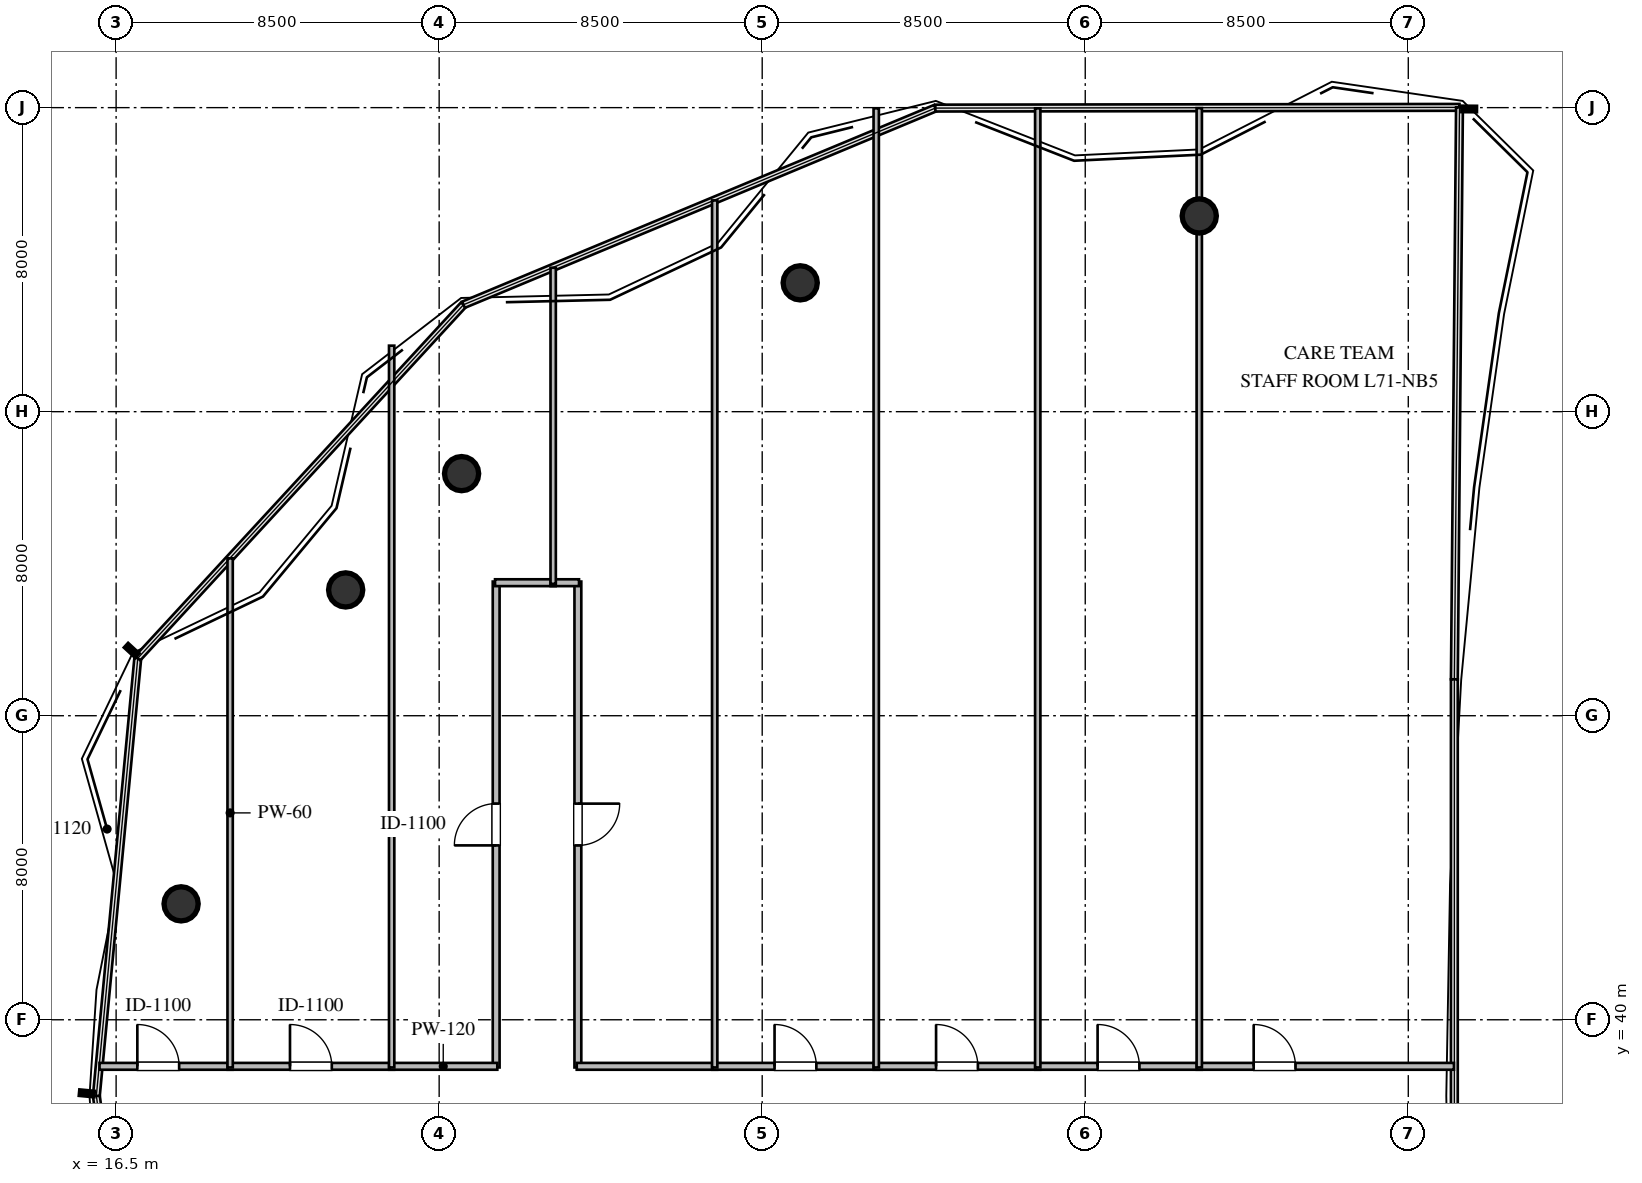
"""IFC4 building model, lengths in metres.
Left out: names, types, materials, properties, quantities, classifications, styles, units other than length and angle.
Written with IfcOpenShell. Run it as: python <this file> out.ifc"""

import sys

from ifc_helpers import new_model, si_unit, direction, frame, frame_2d, origin, origin_2d, place, context, subcontext, project, spatial, rectangle, circle, extrude, element, fill, save


model = new_model("IFC4")
c1 = context("Model", 3, precision=1e-05, world=origin(), true_north=direction((0.0, 1.0)))
c2 = subcontext(c1, "Body", "Model", "MODEL_VIEW")
j1 = project(units=[si_unit("LENGTHUNIT", "METRE"), si_unit("PLANEANGLEUNIT", "RADIAN")], contexts=[c1])
p1 = place(None, origin())
s1 = spatial("IfcSite", under=j1, at=p1, CompositionType="ELEMENT")
p2 = place(p1, origin())
s2 = spatial("IfcBuilding", under=s1, at=p2, CompositionType="ELEMENT")
p3 = place(p2, frame((0.0, 0.0, 270.0)))
s3 = spatial("IfcBuildingStorey", under=s2, at=p3, CompositionType="ELEMENT", Elevation=270.0)
for number, where, z_axis, x_axis in (
    (1, (45.0, 61.15, 0.0), (0.0, 0.0, 1.0), (1.0, 0.0, 0.0)),
    (2, (34.5, 59.39, 0.0), (0.0, 0.0, 1.0), (1.0, 0.0, 0.0)),
    (3, (25.59, 54.37, 0.0), (0.0, 0.0, 1.0), (1.0, 0.0, 0.0)),
    (4, (22.54, 51.31, 0.0), (0.0, 0.0, 1.0), (1.0, 0.0, 0.0)),
    (5, (18.21, 43.05, 0.0), (0.0, 0.0, 1.0), (1.0, 0.0, 0.0)),
):
    element("IfcColumn", number, at=place(p3, frame(where, z_axis=z_axis, x_axis=x_axis)), inside=s3, PredefinedType="COLUMN", context=c2, shape_type="SweptSolid", body=[
        extrude(circle(Radius=0.45, at=origin_2d()), origin(), (0.0, 0.0, 1.0), 3.8),
    ])
p4 = place(p3, frame((16.063, 38.775, 0.0), z_axis=(0.0, 0.0, 1.0), x_axis=(1.0, 0.0, 0.0)))
e6 = element("IfcWall", 6, at=p4, inside=s3, PredefinedType="PARTITIONING", context=c2, shape_type="SweptSolid", body=[
    extrude(rectangle(XDim=3.501, YDim=0.18, at=frame_2d((1.751, 0.0))), origin(), (0.0, 0.0, 1.0), 3.56),
])
p5 = place(p4, frame((0.995, 0.0, 0.0)))
e7 = element("IfcOpeningElement", 7, at=p5, cuts=e6, PredefinedType="OPENING", context=c2, shape_type="SweptSolid", body=[
    extrude(rectangle(XDim=1.1, YDim=2.1, at=frame_2d((0.55, 1.05))), frame((0.0, 0.1, 0.0), z_axis=(0.0, -1.0, 0.0), x_axis=(1.0, 0.0, 0.0)), (0.0, 0.0, 1.0), 0.2),
])
p6 = place(p3, frame((19.435, 38.775, 0.0), z_axis=(0.0, 0.0, 1.0), x_axis=(1.0, 0.0, 0.0)))
e8 = element("IfcWall", 8, at=p6, inside=s3, PredefinedType="PARTITIONING", context=c2, shape_type="SweptSolid", body=[
    extrude(rectangle(XDim=4.38, YDim=0.18, at=frame_2d((2.19, 0.0))), origin(), (0.0, 0.0, 1.0), 3.56),
])
p7 = place(p6, frame((1.64, 0.0, 0.0)))
e9 = element("IfcOpeningElement", 9, at=p7, cuts=e8, PredefinedType="OPENING", context=c2, shape_type="SweptSolid", body=[
    extrude(rectangle(XDim=1.1, YDim=2.1, at=frame_2d((0.55, 1.05))), frame((0.0, 0.1, 0.0), z_axis=(0.0, -1.0, 0.0), x_axis=(1.0, 0.0, 0.0)), (0.0, 0.0, 1.0), 0.2),
])
p8 = place(p3, frame((26.5, 38.745, 0.0), z_axis=(0.0, 0.0, 1.0), x_axis=(0.0, 1.0, 0.0)))
e10 = element("IfcWall", 10, at=p8, inside=s3, PredefinedType="PARTITIONING", context=c2, shape_type="SweptSolid", body=[
    extrude(rectangle(XDim=12.785, YDim=0.18, at=frame_2d((6.393, 0.0))), origin(), (0.0, 0.0, 1.0), 3.56),
])
p9 = place(p8, frame((5.843, 0.0, 0.0)))
e11 = element("IfcOpeningElement", 11, at=p9, cuts=e10, PredefinedType="OPENING", context=c2, shape_type="SweptSolid", body=[
    extrude(rectangle(XDim=1.1, YDim=2.1, at=frame_2d((0.55, 1.05))), frame((0.0, 0.1, 0.0), z_axis=(0.0, -1.0, 0.0), x_axis=(1.0, 0.0, 0.0)), (0.0, 0.0, 1.0), 0.2),
])
p10 = place(p3, frame((23.685, 38.775, 0.0), z_axis=(0.0, 0.0, 1.0), x_axis=(1.0, 0.0, 0.0)))
e12 = element("IfcWall", 12, at=p10, inside=s3, PredefinedType="PARTITIONING", context=c2, shape_type="SweptSolid", body=[
    extrude(rectangle(XDim=2.845, YDim=0.18, at=frame_2d((1.422, 0.0))), origin(), (0.0, 0.0, 1.0), 3.56),
])
p11 = place(p3, frame((26.47, 51.5, 0.0), z_axis=(0.0, 0.0, 1.0), x_axis=(1.0, 0.0, 0.0)))
e13 = element("IfcWall", 13, at=p11, inside=s3, PredefinedType="PARTITIONING", context=c2, shape_type="SweptSolid", body=[
    extrude(rectangle(XDim=1.595, YDim=0.18, at=frame_2d((0.797, 0.0))), origin(), (0.0, 0.0, 1.0), 3.56),
])
p12 = place(p3, frame((28.65, 51.53, 0.0), z_axis=(0.0, 0.0, 1.0), x_axis=(0.0, -1.0, 0.0)))
e14 = element("IfcWall", 14, at=p12, inside=s3, PredefinedType="PARTITIONING", context=c2, shape_type="SweptSolid", body=[
    extrude(rectangle(XDim=12.785, YDim=0.18, at=frame_2d((6.393, 0.0))), origin(), (0.0, 0.0, 1.0), 3.56),
])
p13 = place(p12, frame((5.843, 0.0, 0.0)))
e15 = element("IfcOpeningElement", 15, at=p13, cuts=e14, PredefinedType="OPENING", context=c2, shape_type="SweptSolid", body=[
    extrude(rectangle(XDim=1.1, YDim=2.1, at=frame_2d((0.55, 1.05))), frame((0.0, 0.1, 0.0), z_axis=(0.0, -1.0, 0.0), x_axis=(1.0, 0.0, 0.0)), (0.0, 0.0, 1.0), 0.2),
])
p14 = place(p3, frame((28.62, 38.775, 0.0), z_axis=(0.0, 0.0, 1.0), x_axis=(1.0, 0.0, 0.0)))
e16 = element("IfcWall", 16, at=p14, inside=s3, PredefinedType="PARTITIONING", context=c2, shape_type="SweptSolid", body=[
    extrude(rectangle(XDim=3.695, YDim=0.18, at=frame_2d((1.847, 0.0))), origin(), (0.0, 0.0, 1.0), 3.56),
])
p15 = place(p3, frame((27.935, 51.5, 0.0), z_axis=(0.0, 0.0, 1.0), x_axis=(1.0, 0.0, 0.0)))
e17 = element("IfcWall", 17, at=p15, inside=s3, PredefinedType="PARTITIONING", context=c2, shape_type="SweptSolid", body=[
    extrude(rectangle(XDim=0.745, YDim=0.18, at=frame_2d((0.373, 0.0))), origin(), (0.0, 0.0, 1.0), 3.56),
])
p16 = place(p3, frame((32.185, 38.775, 0.0), z_axis=(0.0, 0.0, 1.0), x_axis=(1.0, 0.0, 0.0)))
e18 = element("IfcWall", 18, at=p16, inside=s3, PredefinedType="PARTITIONING", context=c2, shape_type="SweptSolid", body=[
    extrude(rectangle(XDim=4.38, YDim=0.18, at=frame_2d((2.19, 0.0))), origin(), (0.0, 0.0, 1.0), 3.56),
])
p17 = place(p16, frame((1.64, 0.0, 0.0)))
e19 = element("IfcOpeningElement", 19, at=p17, cuts=e18, PredefinedType="OPENING", context=c2, shape_type="SweptSolid", body=[
    extrude(rectangle(XDim=1.1, YDim=2.1, at=frame_2d((0.55, 1.05))), frame((0.0, 0.1, 0.0), z_axis=(0.0, -1.0, 0.0), x_axis=(1.0, 0.0, 0.0)), (0.0, 0.0, 1.0), 0.2),
])
p18 = place(p3, frame((36.435, 38.775, 0.0), z_axis=(0.0, 0.0, 1.0), x_axis=(1.0, 0.0, 0.0)))
e20 = element("IfcWall", 20, at=p18, inside=s3, PredefinedType="PARTITIONING", context=c2, shape_type="SweptSolid", body=[
    extrude(rectangle(XDim=4.38, YDim=0.18, at=frame_2d((2.19, 0.0))), origin(), (0.0, 0.0, 1.0), 3.56),
])
p19 = place(p18, frame((1.64, 0.0, 0.0)))
e21 = element("IfcOpeningElement", 21, at=p19, cuts=e20, PredefinedType="OPENING", context=c2, shape_type="SweptSolid", body=[
    extrude(rectangle(XDim=1.1, YDim=2.1, at=frame_2d((0.55, 1.05))), frame((0.0, 0.1, 0.0), z_axis=(0.0, -1.0, 0.0), x_axis=(1.0, 0.0, 0.0)), (0.0, 0.0, 1.0), 0.2),
])
p20 = place(p3, frame((40.685, 38.775, 0.0), z_axis=(0.0, 0.0, 1.0), x_axis=(1.0, 0.0, 0.0)))
e22 = element("IfcWall", 22, at=p20, inside=s3, PredefinedType="PARTITIONING", context=c2, shape_type="SweptSolid", body=[
    extrude(rectangle(XDim=4.38, YDim=0.18, at=frame_2d((2.19, 0.0))), origin(), (0.0, 0.0, 1.0), 3.56),
])
p21 = place(p20, frame((1.64, 0.0, 0.0)))
e23 = element("IfcOpeningElement", 23, at=p21, cuts=e22, PredefinedType="OPENING", context=c2, shape_type="SweptSolid", body=[
    extrude(rectangle(XDim=1.1, YDim=2.1, at=frame_2d((0.55, 1.05))), frame((0.0, 0.1, 0.0), z_axis=(0.0, -1.0, 0.0), x_axis=(1.0, 0.0, 0.0)), (0.0, 0.0, 1.0), 0.2),
])
p22 = place(p3, frame((44.935, 38.775, 0.0), z_axis=(0.0, 0.0, 1.0), x_axis=(1.0, 0.0, 0.0)))
e24 = element("IfcWall", 24, at=p22, inside=s3, PredefinedType="PARTITIONING", context=c2, shape_type="SweptSolid", body=[
    extrude(rectangle(XDim=6.767, YDim=0.18, at=frame_2d((3.383, 0.0))), origin(), (0.0, 0.0, 1.0), 3.56),
])
p23 = place(p22, frame((1.497, 0.0, 0.0)))
e25 = element("IfcOpeningElement", 25, at=p23, cuts=e24, PredefinedType="OPENING", context=c2, shape_type="SweptSolid", body=[
    extrude(rectangle(XDim=1.1, YDim=2.1, at=frame_2d((0.55, 1.05))), frame((0.0, 0.1, 0.0), z_axis=(0.0, -1.0, 0.0), x_axis=(1.0, 0.0, 0.0)), (0.0, 0.0, 1.0), 0.2),
])
p24 = place(p3, frame((19.5, 52.141, 0.0), z_axis=(0.0, 0.0, 1.0), x_axis=(0.0, -1.0, 0.0)))
e26 = element("IfcWall", 26, at=p24, inside=s3, PredefinedType="PARTITIONING", context=c2, shape_type="SweptSolid", body=[
    extrude(rectangle(XDim=13.396, YDim=0.14, at=frame_2d((6.698, 0.0))), origin(), (0.0, 0.0, 1.0), 3.017),
])
p25 = place(p3, frame((23.75, 57.737, 0.0), z_axis=(0.0, 0.0, 1.0), x_axis=(0.0, -1.0, 0.0)))
e27 = element("IfcWall", 27, at=p25, inside=s3, PredefinedType="PARTITIONING", context=c2, shape_type="SweptSolid", body=[
    extrude(rectangle(XDim=18.992, YDim=0.14, at=frame_2d((9.496, 0.0))), origin(), (0.0, 0.0, 1.0), 3.09),
])
p26 = place(p3, frame((28.0, 59.787, 0.0), z_axis=(0.0, 0.0, 1.0), x_axis=(0.0, -1.0, 0.0)))
e28 = element("IfcWall", 28, at=p26, inside=s3, PredefinedType="PARTITIONING", context=c2, shape_type="SweptSolid", body=[
    extrude(rectangle(XDim=8.317, YDim=0.14, at=frame_2d((4.159, 0.0))), origin(), (0.0, 0.0, 1.0), 3.56),
])
p27 = place(p3, frame((32.25, 61.558, 0.0), z_axis=(0.0, 0.0, 1.0), x_axis=(0.0, -1.0, 0.0)))
e29 = element("IfcWall", 29, at=p27, inside=s3, PredefinedType="PARTITIONING", context=c2, shape_type="SweptSolid", body=[
    extrude(rectangle(XDim=22.813, YDim=0.14, at=frame_2d((11.407, 0.0))), origin(), (0.0, 0.0, 1.0), 3.56),
])
p28 = place(p3, frame((36.5, 63.982, 0.0), z_axis=(0.0, 0.0, 1.0), x_axis=(0.0, -1.0, 0.0)))
e30 = element("IfcWall", 30, at=p28, inside=s3, PredefinedType="PARTITIONING", context=c2, shape_type="SweptSolid", body=[
    extrude(rectangle(XDim=25.237, YDim=0.14, at=frame_2d((12.618, 0.0))), origin(), (0.0, 0.0, 1.0), 3.56),
])
p29 = place(p3, frame((40.75, 63.982, 0.0), z_axis=(0.0, 0.0, 1.0), x_axis=(0.0, -1.0, 0.0)))
e31 = element("IfcWall", 31, at=p29, inside=s3, PredefinedType="PARTITIONING", context=c2, shape_type="SweptSolid", body=[
    extrude(rectangle(XDim=25.237, YDim=0.14, at=frame_2d((12.618, 0.0))), origin(), (0.0, 0.0, 1.0), 3.56),
])
p30 = place(p3, frame((45.0, 63.988, 0.0), z_axis=(0.0, 0.0, 1.0), x_axis=(0.0, -1.0, 0.0)))
e32 = element("IfcWall", 32, at=p30, inside=s3, PredefinedType="PARTITIONING", context=c2, shape_type="SweptSolid", body=[
    extrude(rectangle(XDim=25.242, YDim=0.14, at=frame_2d((12.621, 0.0))), origin(), (0.0, 0.0, 1.0), 3.09),
])
p31 = place(p5, origin())
e33 = element("IfcDoor", 33, at=p31, inside=s3, OperationType="SINGLE_SWING_LEFT", PredefinedType="DOOR", context=c2, shape_type="SweptSolid", body=[
    extrude(rectangle(XDim=1.1, YDim=2.1, at=frame_2d((0.55, 1.05))), frame((0.0, 0.025, 0.0), z_axis=(0.0, -1.0, 0.0), x_axis=(1.0, 0.0, 0.0)), (0.0, 0.0, 1.0), 0.05),
])
fill(e7, e33)
p32 = place(p7, origin())
e34 = element("IfcDoor", 34, at=p32, inside=s3, OperationType="SINGLE_SWING_LEFT", PredefinedType="DOOR", context=c2, shape_type="SweptSolid", body=[
    extrude(rectangle(XDim=1.1, YDim=2.1, at=frame_2d((0.55, 1.05))), frame((0.0, 0.025, 0.0), z_axis=(0.0, -1.0, 0.0), x_axis=(1.0, 0.0, 0.0)), (0.0, 0.0, 1.0), 0.05),
])
fill(e9, e34)
p33 = place(p9, origin())
e35 = element("IfcDoor", 35, at=p33, inside=s3, OperationType="SINGLE_SWING_LEFT", PredefinedType="DOOR", context=c2, shape_type="SweptSolid", body=[
    extrude(rectangle(XDim=1.1, YDim=2.1, at=frame_2d((0.55, 1.05))), frame((0.0, 0.025, 0.0), z_axis=(0.0, -1.0, 0.0), x_axis=(1.0, 0.0, 0.0)), (0.0, 0.0, 1.0), 0.05),
])
fill(e11, e35)
p34 = place(p13, origin())
e36 = element("IfcDoor", 36, at=p34, inside=s3, OperationType="SINGLE_SWING_LEFT", PredefinedType="DOOR", context=c2, shape_type="SweptSolid", body=[
    extrude(rectangle(XDim=1.1, YDim=2.1, at=frame_2d((0.55, 1.05))), frame((0.0, 0.025, 0.0), z_axis=(0.0, -1.0, 0.0), x_axis=(1.0, 0.0, 0.0)), (0.0, 0.0, 1.0), 0.05),
])
fill(e15, e36)
p35 = place(p17, origin())
e37 = element("IfcDoor", 37, at=p35, inside=s3, OperationType="SINGLE_SWING_LEFT", PredefinedType="DOOR", context=c2, shape_type="SweptSolid", body=[
    extrude(rectangle(XDim=1.1, YDim=2.1, at=frame_2d((0.55, 1.05))), frame((0.0, 0.025, 0.0), z_axis=(0.0, -1.0, 0.0), x_axis=(1.0, 0.0, 0.0)), (0.0, 0.0, 1.0), 0.05),
])
fill(e19, e37)
p36 = place(p19, origin())
e38 = element("IfcDoor", 38, at=p36, inside=s3, OperationType="SINGLE_SWING_LEFT", PredefinedType="DOOR", context=c2, shape_type="SweptSolid", body=[
    extrude(rectangle(XDim=1.1, YDim=2.1, at=frame_2d((0.55, 1.05))), frame((0.0, 0.025, 0.0), z_axis=(0.0, -1.0, 0.0), x_axis=(1.0, 0.0, 0.0)), (0.0, 0.0, 1.0), 0.05),
])
fill(e21, e38)
p37 = place(p21, origin())
e39 = element("IfcDoor", 39, at=p37, inside=s3, OperationType="SINGLE_SWING_LEFT", PredefinedType="DOOR", context=c2, shape_type="SweptSolid", body=[
    extrude(rectangle(XDim=1.1, YDim=2.1, at=frame_2d((0.55, 1.05))), frame((0.0, 0.025, 0.0), z_axis=(0.0, -1.0, 0.0), x_axis=(1.0, 0.0, 0.0)), (0.0, 0.0, 1.0), 0.05),
])
fill(e23, e39)
p38 = place(p23, origin())
e40 = element("IfcDoor", 40, at=p38, inside=s3, OperationType="SINGLE_SWING_LEFT", PredefinedType="DOOR", context=c2, shape_type="SweptSolid", body=[
    extrude(rectangle(XDim=1.1, YDim=2.1, at=frame_2d((0.55, 1.05))), frame((0.0, 0.025, 0.0), z_axis=(0.0, -1.0, 0.0), x_axis=(1.0, 0.0, 0.0)), (0.0, 0.0, 1.0), 0.05),
])
fill(e25, e40)
save(model, sys.argv[1])
